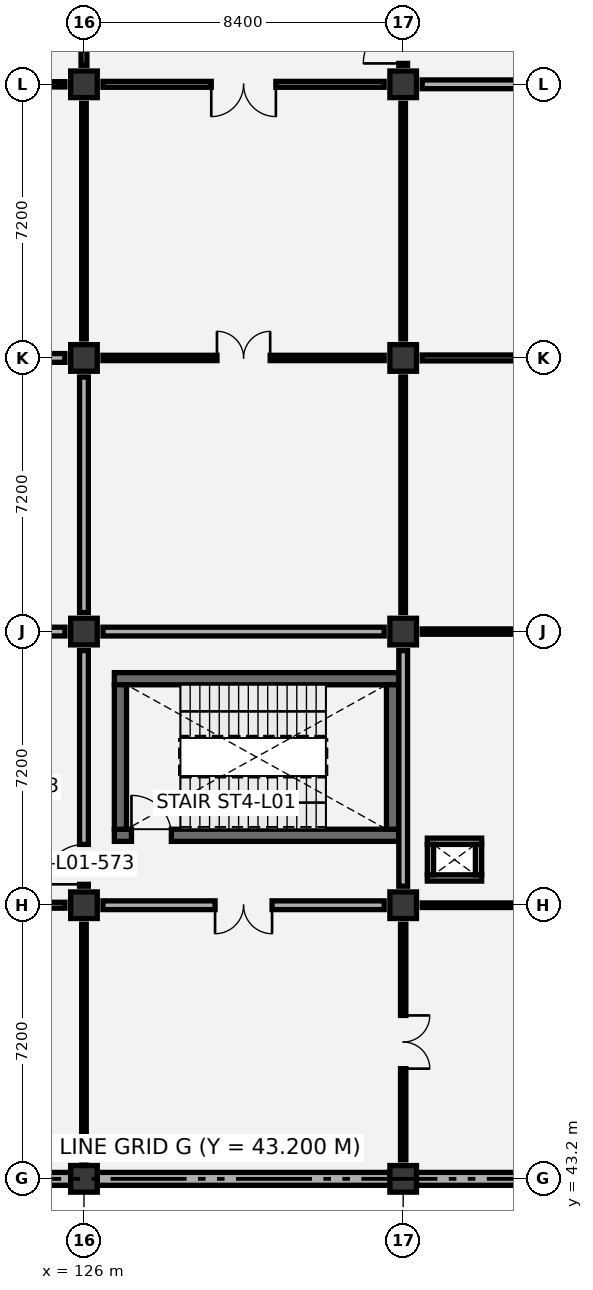
"""IFC4 building model, lengths in metres.
Left out: names, types, materials, properties, quantities, classifications, styles, units other than length and angle.
Written with IfcOpenShell. Run it as: python <this file> out.ifc"""

import sys

from ifc_helpers import new_model, si_unit, direction, frame, frame_2d, origin, origin_2d, place, context, subcontext, project, spatial, rectangle, extrude, element, fill, save


model = new_model("IFC4")
c1 = context("Model", 3, precision=1e-05, world=origin(), true_north=direction((0.0, 1.0)))
c2 = subcontext(c1, "Body", "Model", "MODEL_VIEW")
j1 = project(units=[si_unit("LENGTHUNIT", "METRE"), si_unit("PLANEANGLEUNIT", "RADIAN")], contexts=[c1])
p1 = place(None, origin())
s1 = spatial("IfcSite", under=j1, at=p1, CompositionType="ELEMENT")
p2 = place(p1, origin())
s2 = spatial("IfcBuilding", under=s1, at=p2, CompositionType="ELEMENT")
p3 = place(p2, frame((0.0, 0.0, 6.0)))
s3 = spatial("IfcBuildingStorey", under=s2, at=p3, CompositionType="ELEMENT", Elevation=6.0)
for number, where, z_axis, x_axis in (
    (1, (126.0, 43.2, 0.0), (0.0, 0.0, 1.0), (1.0, 0.0, 0.0)),
    (2, (126.0, 50.4, 0.0), (0.0, 0.0, 1.0), (1.0, 0.0, 0.0)),
    (3, (126.0, 57.6, 0.0), (0.0, 0.0, 1.0), (1.0, 0.0, 0.0)),
    (4, (126.0, 64.8, 0.0), (0.0, 0.0, 1.0), (1.0, 0.0, 0.0)),
    (5, (126.0, 72.0, 0.0), (0.0, 0.0, 1.0), (1.0, 0.0, 0.0)),
    (6, (134.4, 43.2, 0.0), (0.0, 0.0, 1.0), (1.0, 0.0, 0.0)),
    (7, (134.4, 50.4, 0.0), (0.0, 0.0, 1.0), (1.0, 0.0, 0.0)),
    (8, (134.4, 57.6, 0.0), (0.0, 0.0, 1.0), (1.0, 0.0, 0.0)),
    (9, (134.4, 64.8, 0.0), (0.0, 0.0, 1.0), (1.0, 0.0, 0.0)),
    (10, (134.4, 72.0, 0.0), (0.0, 0.0, 1.0), (1.0, 0.0, 0.0)),
):
    element("IfcColumn", number, at=place(p3, frame(where, z_axis=z_axis, x_axis=x_axis)), inside=s3, PredefinedType="COLUMN", context=c2, shape_type="SweptSolid", body=[
        extrude(rectangle(XDim=0.7, YDim=0.7, at=origin_2d()), origin(), (0.0, 0.0, 1.0), 5.4),
    ])
p4 = place(p3, frame((126.8, 52.24, 0.0), z_axis=(0.0, 0.0, 1.0), x_axis=(1.0, 0.0, 0.0)))
e11 = element("IfcWall", 11, at=p4, inside=s3, PredefinedType="SHEAR", context=c2, shape_type="SweptSolid", body=[
    extrude(rectangle(XDim=7.48, YDim=0.32, at=frame_2d((3.74, 0.0))), origin(), (0.0, 0.0, 1.0), 5.075),
])
p5 = place(p4, frame((0.45, 0.0, 0.0)))
e12 = element("IfcOpeningElement", 12, at=p5, cuts=e11, PredefinedType="OPENING", context=c2, shape_type="SweptSolid", body=[
    extrude(rectangle(XDim=1.05, YDim=2.15, at=frame_2d((0.525, 1.075))), frame((0.0, 0.17, 0.0), z_axis=(0.0, -1.0, 0.0), x_axis=(1.0, 0.0, 0.0)), (0.0, 0.0, 1.0), 0.34),
])
p6 = place(p3, frame((126.8, 56.36, 0.0), z_axis=(0.0, 0.0, 1.0), x_axis=(1.0, 0.0, 0.0)))
e13 = element("IfcWall", 13, at=p6, inside=s3, PredefinedType="SHEAR", context=c2, shape_type="SweptSolid", body=[
    extrude(rectangle(XDim=7.48, YDim=0.32, at=frame_2d((3.74, 0.0))), origin(), (0.0, 0.0, 1.0), 5.075),
])
for number, where, z_axis, x_axis in (
    (14, (126.96, 52.4, 0.0), (0.0, 0.0, 1.0), (0.0, 1.0, 0.0)),
    (15, (134.12, 52.4, 0.0), (0.0, 0.0, 1.0), (0.0, 1.0, 0.0)),
):
    element("IfcWall", number, at=place(p3, frame(where, z_axis=z_axis, x_axis=x_axis)), inside=s3, PredefinedType="SHEAR", context=c2, shape_type="SweptSolid", body=[
        extrude(rectangle(XDim=3.8, YDim=0.32, at=frame_2d((1.9, 0.0))), origin(), (0.0, 0.0, 1.0), 5.075),
    ])
p7 = place(p3, frame((118.05, 43.2, 0.0), z_axis=(0.0, 0.0, 1.0), x_axis=(1.0, 0.0, 0.0)))
e16 = element("IfcWall", 16, at=p7, inside=s3, PredefinedType="SOLIDWALL", context=c2, shape_type="SweptSolid", body=[
    extrude(rectangle(XDim=7.6, YDim=0.34, at=frame_2d((3.8, 0.0))), origin(), (0.0, 0.0, 1.0), 4.42),
])
for number, where, z_axis, x_axis in (
    (17, (126.35, 43.2, 0.0), (0.0, 0.0, 1.0), (1.0, 0.0, 0.0)),
    (18, (134.75, 43.2, 0.0), (0.0, 0.0, 1.0), (1.0, 0.0, 0.0)),
):
    element("IfcWall", number, at=place(p3, frame(where, z_axis=z_axis, x_axis=x_axis)), inside=s3, PredefinedType="SOLIDWALL", context=c2, shape_type="SweptSolid", body=[
        extrude(rectangle(XDim=7.7, YDim=0.34, at=frame_2d((3.85, 0.0))), origin(), (0.0, 0.0, 1.0), 4.42),
    ])
for number, where, z_axis, x_axis in (
    (19, (135.035, 51.117, 0.0), (0.0, 0.0, 1.0), (1.0, 0.0, 0.0)),
    (20, (135.035, 52.083, 0.0), (0.0, 0.0, 1.0), (1.0, 0.0, 0.0)),
):
    element("IfcWall", number, at=place(p3, frame(where, z_axis=z_axis, x_axis=x_axis)), inside=s3, PredefinedType="PARTITIONING", context=c2, shape_type="SweptSolid", body=[
        extrude(rectangle(XDim=1.43, YDim=0.165, at=frame_2d((0.715, 0.0))), origin(), (0.0, 0.0, 1.0), 5.075),
    ])
for number, where, z_axis, x_axis in (
    (21, (135.117, 51.2, 0.0), (0.0, 0.0, 1.0), (0.0, 1.0, 0.0)),
    (22, (136.383, 51.2, 0.0), (0.0, 0.0, 1.0), (0.0, 1.0, 0.0)),
):
    element("IfcWall", number, at=place(p3, frame(where, z_axis=z_axis, x_axis=x_axis)), inside=s3, PredefinedType="PARTITIONING", context=c2, shape_type="SweptSolid", body=[
        extrude(rectangle(XDim=0.8, YDim=0.165, at=frame_2d((0.4, 0.0))), origin(), (0.0, 0.0, 1.0), 5.075),
    ])
p8 = place(p3, frame((126.0, 43.7, 0.0), z_axis=(0.0, 0.0, 1.0), x_axis=(0.0, 1.0, 0.0)))
e23 = element("IfcWall", 23, at=p8, inside=s3, PredefinedType="PARTITIONING", context=c2, shape_type="SweptSolid", body=[
    extrude(rectangle(XDim=6.2, YDim=0.12, at=frame_2d((3.1, 0.0))), origin(), (0.0, 0.0, 1.0), 4.57),
])
p9 = place(p3, frame((118.1, 50.4, 0.0), z_axis=(0.0, 0.0, 1.0), x_axis=(1.0, 0.0, 0.0)))
e24 = element("IfcWall", 24, at=p9, inside=s3, PredefinedType="PARTITIONING", context=c2, shape_type="SweptSolid", body=[
    extrude(rectangle(XDim=7.4, YDim=0.155, at=frame_2d((3.7, 0.0))), origin(), (0.0, 0.0, 1.0), 4.27),
])
p10 = place(p9, frame((2.85, 0.0, 0.0)))
e25 = element("IfcOpeningElement", 25, at=p10, cuts=e24, PredefinedType="OPENING", context=c2, shape_type="SweptSolid", body=[
    extrude(rectangle(XDim=1.7, YDim=2.25, at=frame_2d((0.85, 1.125))), frame((0.0, 0.087, 0.0), z_axis=(0.0, -1.0, 0.0), x_axis=(1.0, 0.0, 0.0)), (0.0, 0.0, 1.0), 0.175),
])
p11 = place(p3, frame((126.0, 50.9, 0.0), z_axis=(0.0, 0.0, 1.0), x_axis=(0.0, 1.0, 0.0)))
e26 = element("IfcWall", 26, at=p11, inside=s3, PredefinedType="PARTITIONING", context=c2, shape_type="SweptSolid", body=[
    extrude(rectangle(XDim=6.2, YDim=0.23, at=frame_2d((3.1, 0.0))), origin(), (0.0, 0.0, 1.0), 4.32),
])
p12 = place(p11, frame((0.05, 0.0, 0.0)))
e27 = element("IfcOpeningElement", 27, at=p12, cuts=e26, PredefinedType="OPENING", context=c2, shape_type="SweptSolid", body=[
    extrude(rectangle(XDim=1.05, YDim=2.15, at=frame_2d((0.525, 1.075))), frame((0.0, 0.125, 0.0), z_axis=(0.0, -1.0, 0.0), x_axis=(1.0, 0.0, 0.0)), (0.0, 0.0, 1.0), 0.25),
])
p13 = place(p3, frame((118.1, 57.6, 0.0), z_axis=(0.0, 0.0, 1.0), x_axis=(1.0, 0.0, 0.0)))
e28 = element("IfcWall", 28, at=p13, inside=s3, PredefinedType="PARTITIONING", context=c2, shape_type="SweptSolid", body=[
    extrude(rectangle(XDim=7.4, YDim=0.23, at=frame_2d((3.7, 0.0))), origin(), (0.0, 0.0, 1.0), 4.27),
])
p14 = place(p13, frame((2.95, 0.0, 0.0)))
e29 = element("IfcOpeningElement", 29, at=p14, cuts=e28, PredefinedType="OPENING", context=c2, shape_type="SweptSolid", body=[
    extrude(rectangle(XDim=1.5, YDim=2.15, at=frame_2d((0.75, 1.075))), frame((0.0, 0.125, 0.0), z_axis=(0.0, -1.0, 0.0), x_axis=(1.0, 0.0, 0.0)), (0.0, 0.0, 1.0), 0.25),
])
p15 = place(p3, frame((126.0, 58.1, 0.0), z_axis=(0.0, 0.0, 1.0), x_axis=(0.0, 1.0, 0.0)))
e30 = element("IfcWall", 30, at=p15, inside=s3, PredefinedType="PARTITIONING", context=c2, shape_type="SweptSolid", body=[
    extrude(rectangle(XDim=6.2, YDim=0.23, at=frame_2d((3.1, 0.0))), origin(), (0.0, 0.0, 1.0), 4.67),
])
p16 = place(p3, frame((118.1, 64.8, 0.0), z_axis=(0.0, 0.0, 1.0), x_axis=(1.0, 0.0, 0.0)))
e31 = element("IfcWall", 31, at=p16, inside=s3, PredefinedType="PARTITIONING", context=c2, shape_type="SweptSolid", body=[
    extrude(rectangle(XDim=7.4, YDim=0.23, at=frame_2d((3.7, 0.0))), origin(), (0.0, 0.0, 1.0), 4.27),
])
p17 = place(p3, frame((126.0, 65.3, 0.0), z_axis=(0.0, 0.0, 1.0), x_axis=(0.0, 1.0, 0.0)))
e32 = element("IfcWall", 32, at=p17, inside=s3, PredefinedType="PARTITIONING", context=c2, shape_type="SweptSolid", body=[
    extrude(rectangle(XDim=6.2, YDim=0.12, at=frame_2d((3.1, 0.0))), origin(), (0.0, 0.0, 1.0), 4.32),
])
p18 = place(p3, frame((118.1, 72.0, 0.0), z_axis=(0.0, 0.0, 1.0), x_axis=(1.0, 0.0, 0.0)))
e33 = element("IfcWall", 33, at=p18, inside=s3, PredefinedType="PARTITIONING", context=c2, shape_type="SweptSolid", body=[
    extrude(rectangle(XDim=7.4, YDim=0.14, at=frame_2d((3.7, 0.0))), origin(), (0.0, 0.0, 1.0), 4.27),
])
p19 = place(p18, frame((3.0, 0.0, 0.0)))
e34 = element("IfcOpeningElement", 34, at=p19, cuts=e33, PredefinedType="OPENING", context=c2, shape_type="SweptSolid", body=[
    extrude(rectangle(XDim=1.4, YDim=2.15, at=frame_2d((0.7, 1.075))), frame((0.0, 0.08, 0.0), z_axis=(0.0, -1.0, 0.0), x_axis=(1.0, 0.0, 0.0)), (0.0, 0.0, 1.0), 0.16),
])
p20 = place(p3, frame((126.0, 72.5, 0.0), z_axis=(0.0, 0.0, 1.0), x_axis=(0.0, 1.0, 0.0)))
e35 = element("IfcWall", 35, at=p20, inside=s3, PredefinedType="PARTITIONING", context=c2, shape_type="SweptSolid", body=[
    extrude(rectangle(XDim=6.2, YDim=0.155, at=frame_2d((3.1, 0.0))), origin(), (0.0, 0.0, 1.0), 4.78),
])
p21 = place(p20, frame((2.25, 0.0, 0.0)))
e36 = element("IfcOpeningElement", 36, at=p21, cuts=e35, PredefinedType="OPENING", context=c2, shape_type="SweptSolid", body=[
    extrude(rectangle(XDim=1.7, YDim=2.25, at=frame_2d((0.85, 1.125))), frame((0.0, 0.087, 0.0), z_axis=(0.0, -1.0, 0.0), x_axis=(1.0, 0.0, 0.0)), (0.0, 0.0, 1.0), 0.175),
])
p22 = place(p3, frame((134.4, 43.7, 0.0), z_axis=(0.0, 0.0, 1.0), x_axis=(0.0, 1.0, 0.0)))
e37 = element("IfcWall", 37, at=p22, inside=s3, PredefinedType="PARTITIONING", context=c2, shape_type="SweptSolid", body=[
    extrude(rectangle(XDim=6.2, YDim=0.14, at=frame_2d((3.1, 0.0))), origin(), (0.0, 0.0, 1.0), 4.32),
])
p23 = place(p22, frame((2.4, 0.0, 0.0)))
e38 = element("IfcOpeningElement", 38, at=p23, cuts=e37, PredefinedType="OPENING", context=c2, shape_type="SweptSolid", body=[
    extrude(rectangle(XDim=1.4, YDim=2.15, at=frame_2d((0.7, 1.075))), frame((0.0, 0.08, 0.0), z_axis=(0.0, -1.0, 0.0), x_axis=(1.0, 0.0, 0.0)), (0.0, 0.0, 1.0), 0.16),
])
p24 = place(p3, frame((126.5, 50.4, 0.0), z_axis=(0.0, 0.0, 1.0), x_axis=(1.0, 0.0, 0.0)))
e39 = element("IfcWall", 39, at=p24, inside=s3, PredefinedType="PARTITIONING", context=c2, shape_type="SweptSolid", body=[
    extrude(rectangle(XDim=7.4, YDim=0.23, at=frame_2d((3.7, 0.0))), origin(), (0.0, 0.0, 1.0), 4.27),
])
p25 = place(p24, frame((2.95, 0.0, 0.0)))
e40 = element("IfcOpeningElement", 40, at=p25, cuts=e39, PredefinedType="OPENING", context=c2, shape_type="SweptSolid", body=[
    extrude(rectangle(XDim=1.5, YDim=2.15, at=frame_2d((0.75, 1.075))), frame((0.0, 0.125, 0.0), z_axis=(0.0, -1.0, 0.0), x_axis=(1.0, 0.0, 0.0)), (0.0, 0.0, 1.0), 0.25),
])
p26 = place(p3, frame((134.4, 50.9, 0.0), z_axis=(0.0, 0.0, 1.0), x_axis=(0.0, 1.0, 0.0)))
e41 = element("IfcWall", 41, at=p26, inside=s3, PredefinedType="PARTITIONING", context=c2, shape_type="SweptSolid", body=[
    extrude(rectangle(XDim=6.2, YDim=0.23, at=frame_2d((3.1, 0.0))), origin(), (0.0, 0.0, 1.0), 4.67),
])
p27 = place(p3, frame((126.5, 57.6, 0.0), z_axis=(0.0, 0.0, 1.0), x_axis=(1.0, 0.0, 0.0)))
e42 = element("IfcWall", 42, at=p27, inside=s3, PredefinedType="PARTITIONING", context=c2, shape_type="SweptSolid", body=[
    extrude(rectangle(XDim=7.4, YDim=0.23, at=frame_2d((3.7, 0.0))), origin(), (0.0, 0.0, 1.0), 4.27),
])
p28 = place(p3, frame((134.4, 58.1, 0.0), z_axis=(0.0, 0.0, 1.0), x_axis=(0.0, 1.0, 0.0)))
e43 = element("IfcWall", 43, at=p28, inside=s3, PredefinedType="PARTITIONING", context=c2, shape_type="SweptSolid", body=[
    extrude(rectangle(XDim=6.2, YDim=0.12, at=frame_2d((3.1, 0.0))), origin(), (0.0, 0.0, 1.0), 4.32),
])
p29 = place(p3, frame((126.5, 64.8, 0.0), z_axis=(0.0, 0.0, 1.0), x_axis=(1.0, 0.0, 0.0)))
e44 = element("IfcWall", 44, at=p29, inside=s3, PredefinedType="PARTITIONING", context=c2, shape_type="SweptSolid", body=[
    extrude(rectangle(XDim=7.4, YDim=0.14, at=frame_2d((3.7, 0.0))), origin(), (0.0, 0.0, 1.0), 4.27),
])
p30 = place(p29, frame((3.0, 0.0, 0.0)))
e45 = element("IfcOpeningElement", 45, at=p30, cuts=e44, PredefinedType="OPENING", context=c2, shape_type="SweptSolid", body=[
    extrude(rectangle(XDim=1.4, YDim=2.15, at=frame_2d((0.7, 1.075))), frame((0.0, 0.08, 0.0), z_axis=(0.0, -1.0, 0.0), x_axis=(1.0, 0.0, 0.0)), (0.0, 0.0, 1.0), 0.16),
])
p31 = place(p3, frame((134.4, 65.3, 0.0), z_axis=(0.0, 0.0, 1.0), x_axis=(0.0, 1.0, 0.0)))
e46 = element("IfcWall", 46, at=p31, inside=s3, PredefinedType="PARTITIONING", context=c2, shape_type="SweptSolid", body=[
    extrude(rectangle(XDim=6.2, YDim=0.12, at=frame_2d((3.1, 0.0))), origin(), (0.0, 0.0, 1.0), 4.78),
])
p32 = place(p3, frame((126.5, 72.0, 0.0), z_axis=(0.0, 0.0, 1.0), x_axis=(1.0, 0.0, 0.0)))
e47 = element("IfcWall", 47, at=p32, inside=s3, PredefinedType="PARTITIONING", context=c2, shape_type="SweptSolid", body=[
    extrude(rectangle(XDim=7.4, YDim=0.155, at=frame_2d((3.7, 0.0))), origin(), (0.0, 0.0, 1.0), 4.27),
])
p33 = place(p32, frame((2.85, 0.0, 0.0)))
e48 = element("IfcOpeningElement", 48, at=p33, cuts=e47, PredefinedType="OPENING", context=c2, shape_type="SweptSolid", body=[
    extrude(rectangle(XDim=1.7, YDim=2.25, at=frame_2d((0.85, 1.125))), frame((0.0, 0.087, 0.0), z_axis=(0.0, -1.0, 0.0), x_axis=(1.0, 0.0, 0.0)), (0.0, 0.0, 1.0), 0.175),
])
p34 = place(p3, frame((134.4, 72.5, 0.0), z_axis=(0.0, 0.0, 1.0), x_axis=(0.0, 1.0, 0.0)))
e49 = element("IfcWall", 49, at=p34, inside=s3, PredefinedType="PARTITIONING", context=c2, shape_type="SweptSolid", body=[
    extrude(rectangle(XDim=6.2, YDim=0.23, at=frame_2d((3.1, 0.0))), origin(), (0.0, 0.0, 1.0), 4.32),
])
p35 = place(p34, frame((0.05, 0.0, 0.0)))
e50 = element("IfcOpeningElement", 50, at=p35, cuts=e49, PredefinedType="OPENING", context=c2, shape_type="SweptSolid", body=[
    extrude(rectangle(XDim=1.05, YDim=2.15, at=frame_2d((0.525, 1.075))), frame((0.0, 0.125, 0.0), z_axis=(0.0, -1.0, 0.0), x_axis=(1.0, 0.0, 0.0)), (0.0, 0.0, 1.0), 0.25),
])
p36 = place(p3, frame((134.9, 50.4, 0.0), z_axis=(0.0, 0.0, 1.0), x_axis=(1.0, 0.0, 0.0)))
e51 = element("IfcWall", 51, at=p36, inside=s3, PredefinedType="PARTITIONING", context=c2, shape_type="SweptSolid", body=[
    extrude(rectangle(XDim=7.4, YDim=0.12, at=frame_2d((3.7, 0.0))), origin(), (0.0, 0.0, 1.0), 4.27),
])
p37 = place(p3, frame((134.9, 57.6, 0.0), z_axis=(0.0, 0.0, 1.0), x_axis=(1.0, 0.0, 0.0)))
e52 = element("IfcWall", 52, at=p37, inside=s3, PredefinedType="PARTITIONING", context=c2, shape_type="SweptSolid", body=[
    extrude(rectangle(XDim=7.4, YDim=0.14, at=frame_2d((3.7, 0.0))), origin(), (0.0, 0.0, 1.0), 4.27),
])
p38 = place(p37, frame((2.85, 0.0, 0.0)))
e53 = element("IfcOpeningElement", 53, at=p38, cuts=e52, PredefinedType="OPENING", context=c2, shape_type="SweptSolid", body=[
    extrude(rectangle(XDim=1.7, YDim=2.25, at=frame_2d((0.85, 1.125))), frame((0.0, 0.08, 0.0), z_axis=(0.0, -1.0, 0.0), x_axis=(1.0, 0.0, 0.0)), (0.0, 0.0, 1.0), 0.16),
])
p39 = place(p3, frame((134.9, 64.8, 0.0), z_axis=(0.0, 0.0, 1.0), x_axis=(1.0, 0.0, 0.0)))
e54 = element("IfcWall", 54, at=p39, inside=s3, PredefinedType="PARTITIONING", context=c2, shape_type="SweptSolid", body=[
    extrude(rectangle(XDim=7.4, YDim=0.155, at=frame_2d((3.7, 0.0))), origin(), (0.0, 0.0, 1.0), 4.27),
])
p40 = place(p39, frame((3.0, 0.0, 0.0)))
e55 = element("IfcOpeningElement", 55, at=p40, cuts=e54, PredefinedType="OPENING", context=c2, shape_type="SweptSolid", body=[
    extrude(rectangle(XDim=1.4, YDim=2.15, at=frame_2d((0.7, 1.075))), frame((0.0, 0.087, 0.0), z_axis=(0.0, -1.0, 0.0), x_axis=(1.0, 0.0, 0.0)), (0.0, 0.0, 1.0), 0.175),
])
p41 = place(p3, frame((134.9, 72.0, 0.0), z_axis=(0.0, 0.0, 1.0), x_axis=(1.0, 0.0, 0.0)))
e56 = element("IfcWall", 56, at=p41, inside=s3, PredefinedType="PARTITIONING", context=c2, shape_type="SweptSolid", body=[
    extrude(rectangle(XDim=7.4, YDim=0.23, at=frame_2d((3.7, 0.0))), origin(), (0.0, 0.0, 1.0), 4.27),
])
p42 = place(p41, frame((2.95, 0.0, 0.0)))
e57 = element("IfcOpeningElement", 57, at=p42, cuts=e56, PredefinedType="OPENING", context=c2, shape_type="SweptSolid", body=[
    extrude(rectangle(XDim=1.5, YDim=2.15, at=frame_2d((0.75, 1.075))), frame((0.0, 0.125, 0.0), z_axis=(0.0, -1.0, 0.0), x_axis=(1.0, 0.0, 0.0)), (0.0, 0.0, 1.0), 0.25),
])
p43 = place(p5, origin())
e58 = element("IfcDoor", 58, at=p43, inside=s3, OperationType="SINGLE_SWING_LEFT", PredefinedType="DOOR", context=c2, shape_type="SweptSolid", body=[
    extrude(rectangle(XDim=1.05, YDim=2.15, at=frame_2d((0.525, 1.075))), frame((0.0, 0.025, 0.0), z_axis=(0.0, -1.0, 0.0), x_axis=(1.0, 0.0, 0.0)), (0.0, 0.0, 1.0), 0.05),
])
fill(e12, e58)
p44 = place(p12, origin())
e59 = element("IfcDoor", 59, at=p44, inside=s3, OperationType="SINGLE_SWING_LEFT", PredefinedType="DOOR", context=c2, shape_type="SweptSolid", body=[
    extrude(rectangle(XDim=1.05, YDim=2.15, at=frame_2d((0.525, 1.075))), frame((0.0, 0.025, 0.0), z_axis=(0.0, -1.0, 0.0), x_axis=(1.0, 0.0, 0.0)), (0.0, 0.0, 1.0), 0.05),
])
fill(e27, e59)
p45 = place(p23, frame((1.4, 0.0, 0.0), z_axis=(0.0, 0.0, 1.0), x_axis=(-1.0, 0.0, 0.0)))
e60 = element("IfcDoor", 60, at=p45, inside=s3, OperationType="DOUBLE_DOOR_SINGLE_SWING", PredefinedType="DOOR", context=c2, shape_type="SweptSolid", body=[
    extrude(rectangle(XDim=1.4, YDim=2.15, at=frame_2d((0.7, 1.075))), frame((0.0, 0.025, 0.0), z_axis=(0.0, -1.0, 0.0), x_axis=(1.0, 0.0, 0.0)), (0.0, 0.0, 1.0), 0.05),
])
fill(e38, e60)
p46 = place(p25, frame((1.5, 0.0, 0.0), z_axis=(0.0, 0.0, 1.0), x_axis=(-1.0, 0.0, 0.0)))
e61 = element("IfcDoor", 61, at=p46, inside=s3, OperationType="DOUBLE_DOOR_SINGLE_SWING", PredefinedType="DOOR", context=c2, shape_type="SweptSolid", body=[
    extrude(rectangle(XDim=1.5, YDim=2.15, at=frame_2d((0.75, 1.075))), frame((0.0, 0.025, 0.0), z_axis=(0.0, -1.0, 0.0), x_axis=(1.0, 0.0, 0.0)), (0.0, 0.0, 1.0), 0.05),
])
fill(e40, e61)
p47 = place(p30, origin())
e62 = element("IfcDoor", 62, at=p47, inside=s3, OperationType="DOUBLE_DOOR_SINGLE_SWING", PredefinedType="DOOR", context=c2, shape_type="SweptSolid", body=[
    extrude(rectangle(XDim=1.4, YDim=2.15, at=frame_2d((0.7, 1.075))), frame((0.0, 0.025, 0.0), z_axis=(0.0, -1.0, 0.0), x_axis=(1.0, 0.0, 0.0)), (0.0, 0.0, 1.0), 0.05),
])
fill(e45, e62)
p48 = place(p33, frame((1.7, 0.0, 0.0), z_axis=(0.0, 0.0, 1.0), x_axis=(-1.0, 0.0, 0.0)))
e63 = element("IfcDoor", 63, at=p48, inside=s3, OperationType="DOUBLE_DOOR_SINGLE_SWING", PredefinedType="DOOR", context=c2, shape_type="SweptSolid", body=[
    extrude(rectangle(XDim=1.7, YDim=2.25, at=frame_2d((0.85, 1.125))), frame((0.0, 0.025, 0.0), z_axis=(0.0, -1.0, 0.0), x_axis=(1.0, 0.0, 0.0)), (0.0, 0.0, 1.0), 0.05),
])
fill(e48, e63)
p49 = place(p35, origin())
e64 = element("IfcDoor", 64, at=p49, inside=s3, OperationType="SINGLE_SWING_LEFT", PredefinedType="DOOR", context=c2, shape_type="SweptSolid", body=[
    extrude(rectangle(XDim=1.05, YDim=2.15, at=frame_2d((0.525, 1.075))), frame((0.0, 0.025, 0.0), z_axis=(0.0, -1.0, 0.0), x_axis=(1.0, 0.0, 0.0)), (0.0, 0.0, 1.0), 0.05),
])
fill(e50, e64)
save(model, sys.argv[1])
